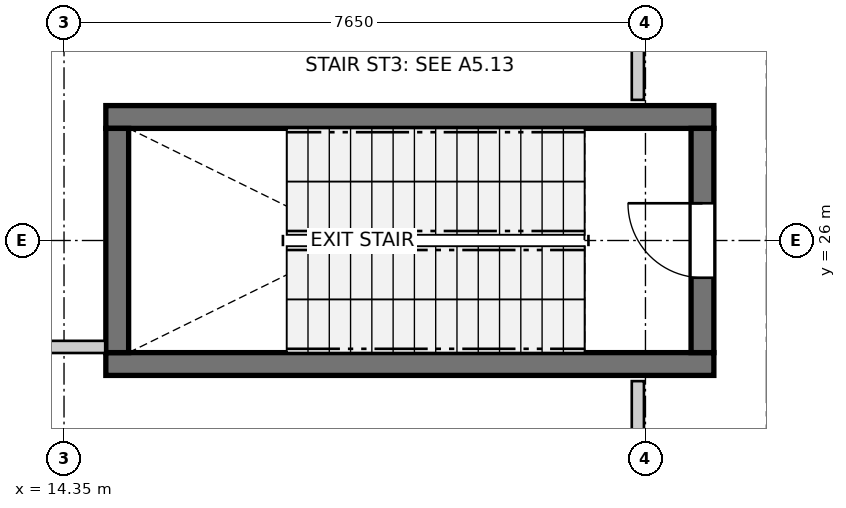
"""IFC4 building model, lengths in metres.
Left out: names, types, materials, properties, quantities, classifications, styles, units other than length and angle.
Written with IfcOpenShell. Run it as: python <this file> out.ifc"""

import sys

from ifc_helpers import new_model, si_unit, direction, frame, frame_2d, origin, place, context, subcontext, project, spatial, rectangle, extrude, source, transform, mapped, element, fill, save


model = new_model("IFC4")
c1 = context("Model", 3, precision=1e-05, world=origin(), true_north=direction((0.0, 1.0)))
c2 = subcontext(c1, "Body", "Model", "MODEL_VIEW")
j1 = project(units=[si_unit("LENGTHUNIT", "METRE"), si_unit("PLANEANGLEUNIT", "RADIAN")], contexts=[c1])
p1 = place(None, origin())
s1 = spatial("IfcSite", under=j1, at=p1, CompositionType="ELEMENT")
p2 = place(p1, origin())
s2 = spatial("IfcBuilding", under=s1, at=p2, CompositionType="ELEMENT")
p3 = place(p2, frame((0.0, 0.0, 65.4)))
s3 = spatial("IfcBuildingStorey", under=s2, at=p3, CompositionType="ELEMENT", Elevation=65.4)
for number, where, z_axis, x_axis in (
    (1, (14.9, 24.375, 0.0), (0.0, 0.0, 1.0), (1.0, 0.0, 0.0)),
    (2, (22.9, 27.625, 0.0), (0.0, 0.0, 1.0), (-1.0, 0.0, 0.0)),
):
    element("IfcWall", number, at=place(p3, frame(where, z_axis=z_axis, x_axis=x_axis)), inside=s3, PredefinedType="SHEAR", context=c2, shape_type="SweptSolid", body=[
        extrude(rectangle(XDim=8.0, YDim=0.3, at=frame_2d((4.0, 0.0))), origin(), (0.0, 0.0, 1.0), 4.75),
    ])
p4 = place(p3, frame((15.05, 27.475, 0.0), z_axis=(0.0, 0.0, 1.0), x_axis=(0.0, -1.0, 0.0)))
e3 = element("IfcWall", 3, at=p4, inside=s3, PredefinedType="SHEAR", context=c2, shape_type="SweptSolid", body=[
    extrude(rectangle(XDim=2.95, YDim=0.3, at=frame_2d((1.475, 0.0))), origin(), (0.0, 0.0, 1.0), 4.75),
])
p5 = place(p3, frame((22.75, 24.525, 0.0), z_axis=(0.0, 0.0, 1.0), x_axis=(0.0, 1.0, 0.0)))
e4 = element("IfcWall", 4, at=p5, inside=s3, PredefinedType="SHEAR", context=c2, shape_type="SweptSolid", body=[
    extrude(rectangle(XDim=2.95, YDim=0.3, at=frame_2d((1.475, 0.0))), origin(), (0.0, 0.0, 1.0), 4.75),
])
p6 = place(p5, frame((0.985, 0.0, 0.0)))
e5 = element("IfcOpeningElement", 5, at=p6, cuts=e4, PredefinedType="OPENING", context=c2, shape_type="SweptSolid", body=[
    extrude(rectangle(XDim=0.98, YDim=2.15, at=frame_2d((0.49, 1.075))), frame((0.0, 0.16, 0.0), z_axis=(0.0, -1.0, 0.0), x_axis=(1.0, 0.0, 0.0)), (0.0, 0.0, 1.0), 0.32),
])
p7 = place(p3, frame((21.9, 27.85, 0.0), z_axis=(0.0, 0.0, 1.0), x_axis=(0.0, 1.0, 0.0)))
e6 = element("IfcWall", 6, at=p7, inside=s3, PredefinedType="PARTITIONING", context=c2, shape_type="SweptSolid", body=[
    extrude(rectangle(XDim=8.85, YDim=0.16, at=frame_2d((4.425, 0.0))), origin(), (0.0, 0.0, 1.0), 4.75),
])
p8 = place(p7, frame((3.754, 0.0, 0.0)))
e7 = element("IfcOpeningElement", 7, at=p8, cuts=e6, PredefinedType="OPENING", context=c2, shape_type="SweptSolid", body=[
    extrude(rectangle(XDim=1.4, YDim=2.15, at=frame_2d((0.7, 1.075))), frame((0.0, 0.09, 0.0), z_axis=(0.0, -1.0, 0.0), x_axis=(1.0, 0.0, 0.0)), (0.0, 0.0, 1.0), 0.18),
])
p9 = place(p3, frame((21.9, 15.3, 0.0), z_axis=(0.0, 0.0, 1.0), x_axis=(0.0, 1.0, 0.0)))
e8 = element("IfcWall", 8, at=p9, inside=s3, PredefinedType="PARTITIONING", context=c2, shape_type="SweptSolid", body=[
    extrude(rectangle(XDim=8.85, YDim=0.16, at=frame_2d((4.425, 0.0))), origin(), (0.0, 0.0, 1.0), 4.75),
])
p10 = place(p9, frame((3.762, 0.0, 0.0)))
e9 = element("IfcOpeningElement", 9, at=p10, cuts=e8, PredefinedType="OPENING", context=c2, shape_type="SweptSolid", body=[
    extrude(rectangle(XDim=1.4, YDim=2.15, at=frame_2d((0.7, 1.075))), frame((0.0, 0.09, 0.0), z_axis=(0.0, -1.0, 0.0), x_axis=(1.0, 0.0, 0.0)), (0.0, 0.0, 1.0), 0.18),
])
p11 = place(p3, frame((3.899, 24.6, 0.0), z_axis=(0.0, 0.0, 1.0), x_axis=(1.0, 0.0, 0.0)))
e10 = element("IfcWall", 10, at=p11, inside=s3, PredefinedType="PARTITIONING", context=c2, shape_type="SweptSolid", body=[
    extrude(rectangle(XDim=10.993, YDim=0.16, at=frame_2d((5.496, 0.0))), origin(), (0.0, 0.0, 1.0), 4.75),
])
m1 = source(origin(), c2, "Body", "SweptSolid", [
    extrude(rectangle(XDim=0.98, YDim=2.15, at=frame_2d((0.49, 1.075))), frame((0.0, 0.025, 0.0), z_axis=(0.0, -1.0, 0.0), x_axis=(1.0, 0.0, 0.0)), (0.0, 0.0, 1.0), 0.05),
])
p12 = place(p6, origin())
e11 = element("IfcDoor", 11, at=p12, inside=s3, OperationType="SINGLE_SWING_RIGHT", PredefinedType="DOOR", context=c2, shape_type="MappedRepresentation", body=[
    mapped(m1, transform((0.0, 0.0, 0.0), x_axis=(1.0, 0.0, 0.0), y_axis=(0.0, 1.0, 0.0), z_axis=(0.0, 0.0, 1.0), scale=1.0)),
])
fill(e5, e11)
save(model, sys.argv[1])
